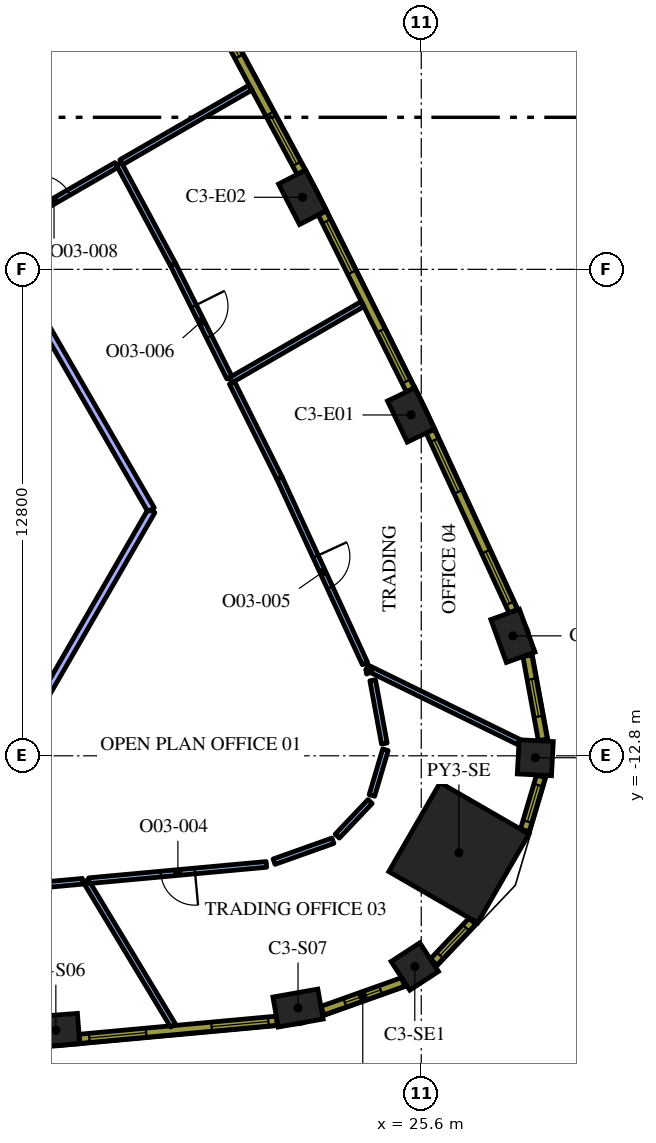
"""IFC4 building model, lengths in metres.
Left out: names, types, materials, properties, quantities, classifications, styles, units other than length and angle.
Written with IfcOpenShell. Run it as: python <this file> out.ifc"""

import sys

from ifc_helpers import new_model, si_unit, direction, frame, frame_2d, origin, origin_2d, place, context, subcontext, project, spatial, rectangle, extrude, element, fill, save


model = new_model("IFC4")
c1 = context("Model", 3, precision=1e-05, world=origin(), true_north=direction((0.0, 1.0)))
c2 = subcontext(c1, "Body", "Model", "MODEL_VIEW")
j1 = project(units=[si_unit("LENGTHUNIT", "METRE"), si_unit("PLANEANGLEUNIT", "RADIAN")], contexts=[c1])
p1 = place(None, origin())
s1 = spatial("IfcSite", under=j1, at=p1, CompositionType="ELEMENT")
p2 = place(p1, origin())
s2 = spatial("IfcBuilding", under=s1, at=p2, CompositionType="ELEMENT")
p3 = place(p2, frame((0.0, 0.0, 171.0)))
s3 = spatial("IfcBuildingStorey", under=s2, at=p3, CompositionType="ELEMENT", Elevation=171.0)
p4 = place(p3, frame((26.591, -15.352, 0.0), z_axis=(0.0, 0.0, 1.0), x_axis=(0.866025403784, -0.5, 0.0)))
e1 = element("IfcColumn", 1, at=p4, inside=s3, PredefinedType="COLUMN", context=c2, shape_type="SweptSolid", body=[
    extrude(rectangle(XDim=2.7, YDim=2.7, at=origin_2d()), origin(), (0.0, 0.0, 1.0), 4.2),
])
for number, where, z_axis, x_axis in (
    (2, (15.985, -20.022, 0.0), (0.0, 0.0, 1.0), (0.997, 0.076, 0.0)),
    (3, (22.357, -19.437, 0.0), (0.0, 0.0, 1.0), (0.985, 0.175, 0.0)),
):
    element("IfcColumn", number, at=place(p3, frame(where, z_axis=z_axis, x_axis=x_axis)), inside=s3, PredefinedType="COLUMN", context=c2, shape_type="SweptSolid", body=[
        extrude(rectangle(XDim=1.2, YDim=0.8, at=origin_2d()), origin(), (0.0, 0.0, 1.0), 4.2),
    ])
for number, where, z_axis, x_axis in (
    (4, (25.43, -18.344, 0.0), (0.0, 0.0, 1.0), (0.838, 0.546, 0.0)),
    (5, (28.601, -12.851, 0.0), (0.0, 0.0, 1.0), (0.053, 0.999, 0.0)),
):
    element("IfcColumn", number, at=place(p3, frame(where, z_axis=z_axis, x_axis=x_axis)), inside=s3, PredefinedType="COLUMN", context=c2, shape_type="SweptSolid", body=[
        extrude(rectangle(XDim=0.9, YDim=0.9, at=origin_2d()), origin(), (0.0, 0.0, 1.0), 4.2),
    ])
for number, where, z_axis, x_axis in (
    (6, (28.012, -9.644, 0.0), (0.0, 0.0, 1.0), (-0.341, 0.94, 0.0)),
    (7, (25.332, -3.832, 0.0), (0.0, 0.0, 1.0), (-0.433, 0.902, 0.0)),
    (8, (22.476, 1.896, 0.0), (0.0, 0.0, 1.0), (-0.46, 0.888, 0.0)),
):
    element("IfcColumn", number, at=place(p3, frame(where, z_axis=z_axis, x_axis=x_axis)), inside=s3, PredefinedType="COLUMN", context=c2, shape_type="SweptSolid", body=[
        extrude(rectangle(XDim=1.2, YDim=0.8, at=origin_2d()), origin(), (0.0, 0.0, 1.0), 4.2),
    ])
p5 = place(p3, frame((16.773, -16.094, 0.0), z_axis=(0.0, 0.0, 1.0), x_axis=(0.516844039178, -0.856079575253, 0.0)))
e9 = element("IfcWall", 9, at=p5, inside=s3, PredefinedType="PARTITIONING", context=c2, shape_type="SweptSolid", body=[
    extrude(rectangle(XDim=4.446, YDim=0.15, at=frame_2d((2.223, 0.0))), origin(), (0.0, 0.0, 1.0), 3.15),
])
p6 = place(p3, frame((15.692, -16.193, 0.0), z_axis=(0.0, 0.0, 1.0), x_axis=(0.995818997537, 0.091348366946, 0.0)))
e10 = element("IfcWall", 10, at=p6, inside=s3, PredefinedType="PARTITIONING", context=c2, shape_type="SweptSolid", body=[
    extrude(rectangle(XDim=1.002, YDim=0.15, at=frame_2d((0.501, 0.0))), origin(), (0.0, 0.0, 1.0), 3.15),
])
p7 = place(p3, frame((24.169, -10.48, 0.0), z_axis=(0.0, 0.0, 1.0), x_axis=(0.898142173557, -0.439705169491, 0.0)))
e11 = element("IfcWall", 11, at=p7, inside=s3, PredefinedType="PARTITIONING", context=c2, shape_type="SweptSolid", body=[
    extrude(rectangle(XDim=4.458, YDim=0.15, at=frame_2d((2.229, 0.0))), origin(), (0.0, 0.0, 1.0), 3.15),
])
p8 = place(p3, frame((21.525, -15.657, 0.0), z_axis=(0.0, 0.0, 1.0), x_axis=(-0.99581172086, -0.091427657734, 0.0)))
e12 = element("IfcWall", 12, at=p8, inside=s3, PredefinedType="PARTITIONING", context=c2, shape_type="SweptSolid", body=[
    extrude(rectangle(XDim=4.689, YDim=0.15, at=frame_2d((2.344, 0.0))), origin(), (0.0, 0.0, 1.0), 3.15),
])
p9 = place(p8, frame((1.889, 0.0, 0.0)))
e13 = element("IfcOpeningElement", 13, at=p9, cuts=e12, PredefinedType="OPENING", context=c2, shape_type="SweptSolid", body=[
    extrude(rectangle(XDim=0.9, YDim=2.1, at=frame_2d((0.45, 1.05))), frame((0.0, 0.085, 0.0), z_axis=(0.0, -1.0, 0.0), x_axis=(1.0, 0.0, 0.0)), (0.0, 0.0, 1.0), 0.17),
])
p10 = place(p3, frame((21.727, -15.586, 0.0), z_axis=(0.0, 0.0, 1.0), x_axis=(0.942087520852, 0.335367116835, 0.0)))
e14 = element("IfcWall", 14, at=p10, inside=s3, PredefinedType="PARTITIONING", context=c2, shape_type="SweptSolid", body=[
    extrude(rectangle(XDim=1.644, YDim=0.15, at=frame_2d((0.822, 0.0))), origin(), (0.0, 0.0, 1.0), 3.15),
])
p11 = place(p3, frame((23.389, -14.914, 0.0), z_axis=(0.0, 0.0, 1.0), x_axis=(0.688003360899, 0.725707499886, 0.0)))
e15 = element("IfcWall", 15, at=p11, inside=s3, PredefinedType="PARTITIONING", context=c2, shape_type="SweptSolid", body=[
    extrude(rectangle(XDim=1.256, YDim=0.15, at=frame_2d((0.628, 0.0))), origin(), (0.0, 0.0, 1.0), 3.15),
])
p12 = place(p3, frame((24.301, -13.844, 0.0), z_axis=(0.0, 0.0, 1.0), x_axis=(0.284386145133, 0.958709820778, 0.0)))
e16 = element("IfcWall", 16, at=p12, inside=s3, PredefinedType="PARTITIONING", context=c2, shape_type="SweptSolid", body=[
    extrude(rectangle(XDim=1.256, YDim=0.15, at=frame_2d((0.628, 0.0))), origin(), (0.0, 0.0, 1.0), 3.15),
])
p13 = place(p3, frame((24.628, -12.477, 0.0), z_axis=(0.0, 0.0, 1.0), x_axis=(-0.180725554657, 0.98353356521, 0.0)))
e17 = element("IfcWall", 17, at=p13, inside=s3, PredefinedType="PARTITIONING", context=c2, shape_type="SweptSolid", body=[
    extrude(rectangle(XDim=1.693, YDim=0.15, at=frame_2d((0.846, 0.0))), origin(), (0.0, 0.0, 1.0), 3.15),
])
p14 = place(p3, frame((24.233, -10.618, 0.0), z_axis=(0.0, 0.0, 1.0), x_axis=(-0.423685108901, 0.905809543169, 0.0)))
e18 = element("IfcWall", 18, at=p14, inside=s3, PredefinedType="PARTITIONING", context=c2, shape_type="SweptSolid", body=[
    extrude(rectangle(XDim=0.033, YDim=0.15, at=frame_2d((0.017, 0.0))), origin(), (0.0, 0.0, 1.0), 3.15),
])
p15 = place(p3, frame((20.585, -2.916, 0.0), z_axis=(0.0, 0.0, 1.0), x_axis=(0.866041532296, 0.499972063559, 0.0)))
e19 = element("IfcWall", 19, at=p15, inside=s3, PredefinedType="PARTITIONING", context=c2, shape_type="SweptSolid", body=[
    extrude(rectangle(XDim=4.008, YDim=0.15, at=frame_2d((2.004, 0.0))), origin(), (0.0, 0.0, 1.0), 3.15),
])
p16 = place(p3, frame((21.869, -5.493, 0.0), z_axis=(0.0, 0.0, 1.0), x_axis=(0.4187440514, -0.908104299856, 0.0)))
e20 = element("IfcWall", 20, at=p16, inside=s3, PredefinedType="PARTITIONING", context=c2, shape_type="SweptSolid", body=[
    extrude(rectangle(XDim=5.373, YDim=0.15, at=frame_2d((2.686, 0.0))), origin(), (0.0, 0.0, 1.0), 3.15),
])
p17 = place(p16, frame((2.273, 0.0, 0.0)))
e21 = element("IfcOpeningElement", 21, at=p17, cuts=e20, PredefinedType="OPENING", context=c2, shape_type="SweptSolid", body=[
    extrude(rectangle(XDim=0.9, YDim=2.1, at=frame_2d((0.45, 1.05))), frame((0.0, 0.085, 0.0), z_axis=(0.0, -1.0, 0.0), x_axis=(1.0, 0.0, 0.0)), (0.0, 0.0, 1.0), 0.17),
])
p18 = place(p3, frame((21.869, -5.493, 0.0), z_axis=(0.0, 0.0, 1.0), x_axis=(-0.446168399468, 0.894949026099, 0.0)))
e22 = element("IfcWall", 22, at=p18, inside=s3, PredefinedType="PARTITIONING", context=c2, shape_type="SweptSolid", body=[
    extrude(rectangle(XDim=2.804, YDim=0.15, at=frame_2d((1.402, 0.0))), origin(), (0.0, 0.0, 1.0), 3.15),
])
p19 = place(p3, frame((19.066, 0.129, 0.0), z_axis=(0.0, 0.0, 1.0), x_axis=(0.446215695511, -0.894925445543, 0.0)))
e23 = element("IfcWall", 23, at=p19, inside=s3, PredefinedType="PARTITIONING", context=c2, shape_type="SweptSolid", body=[
    extrude(rectangle(XDim=3.328, YDim=0.15, at=frame_2d((1.664, 0.0))), origin(), (0.0, 0.0, 1.0), 3.15),
])
p20 = place(p19, frame((1.228, 0.0, 0.0)))
e24 = element("IfcOpeningElement", 24, at=p20, cuts=e23, PredefinedType="OPENING", context=c2, shape_type="SweptSolid", body=[
    extrude(rectangle(XDim=0.9, YDim=2.1, at=frame_2d((0.45, 1.05))), frame((0.0, 0.085, 0.0), z_axis=(0.0, -1.0, 0.0), x_axis=(1.0, 0.0, 0.0)), (0.0, 0.0, 1.0), 0.17),
])
p21 = place(p3, frame((19.066, 0.129, 0.0), z_axis=(0.0, 0.0, 1.0), x_axis=(-0.473359743891, 0.88086920304, 0.0)))
e25 = element("IfcWall", 25, at=p21, inside=s3, PredefinedType="PARTITIONING", context=c2, shape_type="SweptSolid", body=[
    extrude(rectangle(XDim=3.01, YDim=0.15, at=frame_2d((1.505, 0.0))), origin(), (0.0, 0.0, 1.0), 3.15),
])
p22 = place(p3, frame((17.706, 2.819, 0.0), z_axis=(0.0, 0.0, 1.0), x_axis=(0.866023031919, 0.500004108169, 0.0)))
e26 = element("IfcWall", 26, at=p22, inside=s3, PredefinedType="PARTITIONING", context=c2, shape_type="SweptSolid", body=[
    extrude(rectangle(XDim=3.927, YDim=0.15, at=frame_2d((1.963, 0.0))), origin(), (0.0, 0.0, 1.0), 3.15),
])
p23 = place(p3, frame((14.334, 0.872, 0.0), z_axis=(0.0, 0.0, 1.0), x_axis=(0.866027010039, 0.499997217876, 0.0)))
e27 = element("IfcWall", 27, at=p23, inside=s3, PredefinedType="PARTITIONING", context=c2, shape_type="SweptSolid", body=[
    extrude(rectangle(XDim=3.743, YDim=0.15, at=frame_2d((1.872, 0.0))), origin(), (0.0, 0.0, 1.0), 3.15),
])
p24 = place(p23, frame((1.4, 0.0, 0.0)))
e28 = element("IfcOpeningElement", 28, at=p24, cuts=e27, PredefinedType="OPENING", context=c2, shape_type="SweptSolid", body=[
    extrude(rectangle(XDim=0.9, YDim=2.1, at=frame_2d((0.45, 1.05))), frame((0.0, 0.085, 0.0), z_axis=(0.0, -1.0, 0.0), x_axis=(1.0, 0.0, 0.0)), (0.0, 0.0, 1.0), 0.17),
])
p25 = place(p3, frame((14.766, -12.824, 0.0), z_axis=(0.0, 0.0, 1.0), x_axis=(0.500009869004, 0.866019705837, 0.0)))
e29 = element("IfcWall", 29, at=p25, inside=s3, PredefinedType="PARTITIONING", context=c2, shape_type="SweptSolid", body=[
    extrude(rectangle(XDim=7.475, YDim=0.2, at=frame_2d((3.738, 0.0))), origin(), (0.0, 0.0, 1.0), 3.15),
])
p26 = place(p3, frame((18.489, -6.324, 0.0), z_axis=(0.0, 0.0, 1.0), x_axis=(-0.500003913404, 0.866023144368, 0.0)))
e30 = element("IfcWall", 30, at=p26, inside=s3, PredefinedType="PARTITIONING", context=c2, shape_type="SweptSolid", body=[
    extrude(rectangle(XDim=8.234, YDim=0.2, at=frame_2d((4.117, 0.0))), origin(), (0.0, 0.0, 1.0), 3.15),
])
p27 = place(p3, frame((16.606, -20.247, 0.0), z_axis=(0.0, 0.0, 1.0), x_axis=(0.995808712151, 0.091460422067, 0.0)))
e31 = element("IfcWall", 31, at=p27, inside=s3, PredefinedType="SOLIDWALL", context=c2, shape_type="SweptSolid", body=[
    extrude(rectangle(XDim=5.213, YDim=0.24, at=frame_2d((2.606, 0.0))), origin(), (0.0, 0.0, 1.0), 3.95),
])
p28 = place(p27, frame((0.261, 0.0, 0.9)))
e32 = element("IfcOpeningElement", 32, at=p28, cuts=e31, PredefinedType="OPENING", context=c2, shape_type="SweptSolid", body=[
    extrude(rectangle(XDim=1.5, YDim=2.55, at=frame_2d((0.75, 1.275))), frame((0.0, 0.13, 0.0), z_axis=(0.0, -1.0, 0.0), x_axis=(1.0, 0.0, 0.0)), (0.0, 0.0, 1.0), 0.26),
])
p29 = place(p27, frame((3.492, 0.0, 0.9)))
e33 = element("IfcOpeningElement", 33, at=p29, cuts=e31, PredefinedType="OPENING", context=c2, shape_type="SweptSolid", body=[
    extrude(rectangle(XDim=1.5, YDim=2.55, at=frame_2d((0.75, 1.275))), frame((0.0, 0.13, 0.0), z_axis=(0.0, -1.0, 0.0), x_axis=(1.0, 0.0, 0.0)), (0.0, 0.0, 1.0), 0.26),
])
p30 = place(p3, frame((23.001, -19.505, 0.0), z_axis=(0.0, 0.0, 1.0), x_axis=(0.942099727267, 0.335332825539, 0.0)))
e34 = element("IfcWall", 34, at=p30, inside=s3, PredefinedType="SOLIDWALL", context=c2, shape_type="SweptSolid", body=[
    extrude(rectangle(XDim=2.25, YDim=0.24, at=frame_2d((1.125, 0.0))), origin(), (0.0, 0.0, 1.0), 3.95),
])
p31 = place(p30, frame((0.625, 0.0, 0.9)))
e35 = element("IfcOpeningElement", 35, at=p31, cuts=e34, PredefinedType="OPENING", context=c2, shape_type="SweptSolid", body=[
    extrude(rectangle(XDim=1.0, YDim=2.55, at=frame_2d((0.5, 1.275))), frame((0.0, 0.13, 0.0), z_axis=(0.0, -1.0, 0.0), x_axis=(1.0, 0.0, 0.0)), (0.0, 0.0, 1.0), 0.26),
])
p32 = place(p3, frame((25.927, -18.226, 0.0), z_axis=(0.0, 0.0, 1.0), x_axis=(0.687986858937, 0.725723144133, 0.0)))
e36 = element("IfcWall", 36, at=p32, inside=s3, PredefinedType="SOLIDWALL", context=c2, shape_type="SweptSolid", body=[
    extrude(rectangle(XDim=1.481, YDim=0.24, at=frame_2d((0.741, 0.0))), origin(), (0.0, 0.0, 1.0), 3.95),
])
p33 = place(p32, frame((0.241, 0.0, 0.9)))
e37 = element("IfcOpeningElement", 37, at=p33, cuts=e36, PredefinedType="OPENING", context=c2, shape_type="SweptSolid", body=[
    extrude(rectangle(XDim=1.0, YDim=2.55, at=frame_2d((0.5, 1.275))), frame((0.0, 0.13, 0.0), z_axis=(0.0, -1.0, 0.0), x_axis=(1.0, 0.0, 0.0)), (0.0, 0.0, 1.0), 0.26),
])
p34 = place(p3, frame((28.326, -14.76, 0.0), z_axis=(0.0, 0.0, 1.0), x_axis=(0.284413721403, 0.958701640281, 0.0)))
e38 = element("IfcWall", 38, at=p34, inside=s3, PredefinedType="SOLIDWALL", context=c2, shape_type="SweptSolid", body=[
    extrude(rectangle(XDim=1.482, YDim=0.24, at=frame_2d((0.741, 0.0))), origin(), (0.0, 0.0, 1.0), 3.95),
])
p35 = place(p34, frame((0.241, 0.0, 0.9)))
e39 = element("IfcOpeningElement", 39, at=p35, cuts=e38, PredefinedType="OPENING", context=c2, shape_type="SweptSolid", body=[
    extrude(rectangle(XDim=1.0, YDim=2.55, at=frame_2d((0.5, 1.275))), frame((0.0, 0.13, 0.0), z_axis=(0.0, -1.0, 0.0), x_axis=(1.0, 0.0, 0.0)), (0.0, 0.0, 1.0), 0.26),
])
p36 = place(p3, frame((28.799, -12.38, 0.0), z_axis=(0.0, 0.0, 1.0), x_axis=(-0.180737189259, 0.983531427265, 0.0)))
e40 = element("IfcWall", 40, at=p36, inside=s3, PredefinedType="SOLIDWALL", context=c2, shape_type="SweptSolid", body=[
    extrude(rectangle(XDim=2.25, YDim=0.24, at=frame_2d((1.125, 0.0))), origin(), (0.0, 0.0, 1.0), 3.95),
])
p37 = place(p36, frame((0.625, 0.0, 0.9)))
e41 = element("IfcOpeningElement", 41, at=p37, cuts=e40, PredefinedType="OPENING", context=c2, shape_type="SweptSolid", body=[
    extrude(rectangle(XDim=1.0, YDim=2.55, at=frame_2d((0.5, 1.275))), frame((0.0, 0.13, 0.0), z_axis=(0.0, -1.0, 0.0), x_axis=(1.0, 0.0, 0.0)), (0.0, 0.0, 1.0), 0.26),
])
p38 = place(p3, frame((28.02, -8.992, 0.0), z_axis=(0.0, 0.0, 1.0), x_axis=(-0.418722559465, 0.908114209885, 0.0)))
e42 = element("IfcWall", 42, at=p38, inside=s3, PredefinedType="SOLIDWALL", context=c2, shape_type="SweptSolid", body=[
    extrude(rectangle(XDim=5.213, YDim=0.24, at=frame_2d((2.606, 0.0))), origin(), (0.0, 0.0, 1.0), 3.95),
])
p39 = place(p38, frame((0.221, 0.0, 0.9)))
e43 = element("IfcOpeningElement", 43, at=p39, cuts=e42, PredefinedType="OPENING", context=c2, shape_type="SweptSolid", body=[
    extrude(rectangle(XDim=1.5, YDim=2.55, at=frame_2d((0.75, 1.275))), frame((0.0, 0.13, 0.0), z_axis=(0.0, -1.0, 0.0), x_axis=(1.0, 0.0, 0.0)), (0.0, 0.0, 1.0), 0.26),
])
p40 = place(p38, frame((3.452, 0.0, 0.9)))
e44 = element("IfcOpeningElement", 44, at=p40, cuts=e42, PredefinedType="OPENING", context=c2, shape_type="SweptSolid", body=[
    extrude(rectangle(XDim=1.5, YDim=2.55, at=frame_2d((0.75, 1.275))), frame((0.0, 0.13, 0.0), z_axis=(0.0, -1.0, 0.0), x_axis=(1.0, 0.0, 0.0)), (0.0, 0.0, 1.0), 0.26),
])
p41 = place(p3, frame((25.316, -3.171, 0.0), z_axis=(0.0, 0.0, 1.0), x_axis=(-0.446256171312, 0.8949052629, 0.0)))
e45 = element("IfcWall", 45, at=p41, inside=s3, PredefinedType="SOLIDWALL", context=c2, shape_type="SweptSolid", body=[
    extrude(rectangle(XDim=5.203, YDim=0.24, at=frame_2d((2.602, 0.0))), origin(), (0.0, 0.0, 1.0), 3.95),
])
p42 = place(p41, frame((0.248, 0.0, 0.9)))
e46 = element("IfcOpeningElement", 46, at=p42, cuts=e45, PredefinedType="OPENING", context=c2, shape_type="SweptSolid", body=[
    extrude(rectangle(XDim=1.5, YDim=2.55, at=frame_2d((0.75, 1.275))), frame((0.0, 0.13, 0.0), z_axis=(0.0, -1.0, 0.0), x_axis=(1.0, 0.0, 0.0)), (0.0, 0.0, 1.0), 0.26),
])
p43 = place(p41, frame((3.455, 0.0, 0.9)))
e47 = element("IfcOpeningElement", 47, at=p43, cuts=e45, PredefinedType="OPENING", context=c2, shape_type="SweptSolid", body=[
    extrude(rectangle(XDim=1.5, YDim=2.55, at=frame_2d((0.75, 1.275))), frame((0.0, 0.13, 0.0), z_axis=(0.0, -1.0, 0.0), x_axis=(1.0, 0.0, 0.0)), (0.0, 0.0, 1.0), 0.26),
])
p44 = place(p3, frame((22.44, 2.555, 0.0), z_axis=(0.0, 0.0, 1.0), x_axis=(-0.473349833294, 0.880874528704, 0.0)))
e48 = element("IfcWall", 48, at=p44, inside=s3, PredefinedType="SOLIDWALL", context=c2, shape_type="SweptSolid", body=[
    extrude(rectangle(XDim=5.204, YDim=0.24, at=frame_2d((2.602, 0.0))), origin(), (0.0, 0.0, 1.0), 3.95),
])
p45 = place(p44, frame((0.248, 0.0, 0.9)))
e49 = element("IfcOpeningElement", 49, at=p45, cuts=e48, PredefinedType="OPENING", context=c2, shape_type="SweptSolid", body=[
    extrude(rectangle(XDim=1.5, YDim=2.55, at=frame_2d((0.75, 1.275))), frame((0.0, 0.13, 0.0), z_axis=(0.0, -1.0, 0.0), x_axis=(1.0, 0.0, 0.0)), (0.0, 0.0, 1.0), 0.26),
])
p46 = place(p44, frame((3.455, 0.0, 0.9)))
e50 = element("IfcOpeningElement", 50, at=p46, cuts=e48, PredefinedType="OPENING", context=c2, shape_type="SweptSolid", body=[
    extrude(rectangle(XDim=1.5, YDim=2.55, at=frame_2d((0.75, 1.275))), frame((0.0, 0.13, 0.0), z_axis=(0.0, -1.0, 0.0), x_axis=(1.0, 0.0, 0.0)), (0.0, 0.0, 1.0), 0.26),
])
p47 = place(p9, origin())
e51 = element("IfcDoor", 51, at=p47, inside=s3, OperationType="SINGLE_SWING_LEFT", PredefinedType="DOOR", context=c2, shape_type="SweptSolid", body=[
    extrude(rectangle(XDim=0.9, YDim=2.1, at=frame_2d((0.45, 1.05))), frame((0.0, 0.025, 0.0), z_axis=(0.0, -1.0, 0.0), x_axis=(1.0, 0.0, 0.0)), (0.0, 0.0, 1.0), 0.05),
])
fill(e13, e51)
p48 = place(p17, origin())
e52 = element("IfcDoor", 52, at=p48, inside=s3, OperationType="SINGLE_SWING_RIGHT", PredefinedType="DOOR", context=c2, shape_type="SweptSolid", body=[
    extrude(rectangle(XDim=0.9, YDim=2.1, at=frame_2d((0.45, 1.05))), frame((0.0, 0.025, 0.0), z_axis=(0.0, -1.0, 0.0), x_axis=(1.0, 0.0, 0.0)), (0.0, 0.0, 1.0), 0.05),
])
fill(e21, e52)
p49 = place(p20, origin())
e53 = element("IfcDoor", 53, at=p49, inside=s3, OperationType="SINGLE_SWING_RIGHT", PredefinedType="DOOR", context=c2, shape_type="SweptSolid", body=[
    extrude(rectangle(XDim=0.9, YDim=2.1, at=frame_2d((0.45, 1.05))), frame((0.0, 0.025, 0.0), z_axis=(0.0, -1.0, 0.0), x_axis=(1.0, 0.0, 0.0)), (0.0, 0.0, 1.0), 0.05),
])
fill(e24, e53)
p50 = place(p24, origin())
e54 = element("IfcDoor", 54, at=p50, inside=s3, OperationType="SINGLE_SWING_LEFT", PredefinedType="DOOR", context=c2, shape_type="SweptSolid", body=[
    extrude(rectangle(XDim=0.9, YDim=2.1, at=frame_2d((0.45, 1.05))), frame((0.0, 0.025, 0.0), z_axis=(0.0, -1.0, 0.0), x_axis=(1.0, 0.0, 0.0)), (0.0, 0.0, 1.0), 0.05),
])
fill(e28, e54)
p51 = place(p28, origin())
e55 = element("IfcWindow", 55, at=p51, inside=s3, PartitioningType="SINGLE_PANEL", PredefinedType="WINDOW", context=c2, shape_type="SweptSolid", body=[
    extrude(rectangle(XDim=1.5, YDim=2.55, at=frame_2d((0.75, 1.275))), frame((0.0, 0.04, 0.0), z_axis=(0.0, -1.0, 0.0), x_axis=(1.0, 0.0, 0.0)), (0.0, 0.0, 1.0), 0.06),
])
fill(e32, e55)
p52 = place(p29, origin())
e56 = element("IfcWindow", 56, at=p52, inside=s3, PartitioningType="SINGLE_PANEL", PredefinedType="WINDOW", context=c2, shape_type="SweptSolid", body=[
    extrude(rectangle(XDim=1.5, YDim=2.55, at=frame_2d((0.75, 1.275))), frame((0.0, 0.04, 0.0), z_axis=(0.0, -1.0, 0.0), x_axis=(1.0, 0.0, 0.0)), (0.0, 0.0, 1.0), 0.06),
])
fill(e33, e56)
p53 = place(p31, origin())
e57 = element("IfcWindow", 57, at=p53, inside=s3, PartitioningType="SINGLE_PANEL", PredefinedType="WINDOW", context=c2, shape_type="SweptSolid", body=[
    extrude(rectangle(XDim=1.0, YDim=2.55, at=frame_2d((0.5, 1.275))), frame((0.0, 0.04, 0.0), z_axis=(0.0, -1.0, 0.0), x_axis=(1.0, 0.0, 0.0)), (0.0, 0.0, 1.0), 0.06),
])
fill(e35, e57)
p54 = place(p33, origin())
e58 = element("IfcWindow", 58, at=p54, inside=s3, PartitioningType="SINGLE_PANEL", PredefinedType="WINDOW", context=c2, shape_type="SweptSolid", body=[
    extrude(rectangle(XDim=1.0, YDim=2.55, at=frame_2d((0.5, 1.275))), frame((0.0, 0.04, 0.0), z_axis=(0.0, -1.0, 0.0), x_axis=(1.0, 0.0, 0.0)), (0.0, 0.0, 1.0), 0.06),
])
fill(e37, e58)
p55 = place(p35, origin())
e59 = element("IfcWindow", 59, at=p55, inside=s3, PartitioningType="SINGLE_PANEL", PredefinedType="WINDOW", context=c2, shape_type="SweptSolid", body=[
    extrude(rectangle(XDim=1.0, YDim=2.55, at=frame_2d((0.5, 1.275))), frame((0.0, 0.04, 0.0), z_axis=(0.0, -1.0, 0.0), x_axis=(1.0, 0.0, 0.0)), (0.0, 0.0, 1.0), 0.06),
])
fill(e39, e59)
p56 = place(p37, origin())
e60 = element("IfcWindow", 60, at=p56, inside=s3, PartitioningType="SINGLE_PANEL", PredefinedType="WINDOW", context=c2, shape_type="SweptSolid", body=[
    extrude(rectangle(XDim=1.0, YDim=2.55, at=frame_2d((0.5, 1.275))), frame((0.0, 0.04, 0.0), z_axis=(0.0, -1.0, 0.0), x_axis=(1.0, 0.0, 0.0)), (0.0, 0.0, 1.0), 0.06),
])
fill(e41, e60)
p57 = place(p39, origin())
e61 = element("IfcWindow", 61, at=p57, inside=s3, PartitioningType="SINGLE_PANEL", PredefinedType="WINDOW", context=c2, shape_type="SweptSolid", body=[
    extrude(rectangle(XDim=1.5, YDim=2.55, at=frame_2d((0.75, 1.275))), frame((0.0, 0.04, 0.0), z_axis=(0.0, -1.0, 0.0), x_axis=(1.0, 0.0, 0.0)), (0.0, 0.0, 1.0), 0.06),
])
fill(e43, e61)
p58 = place(p40, origin())
e62 = element("IfcWindow", 62, at=p58, inside=s3, PartitioningType="SINGLE_PANEL", PredefinedType="WINDOW", context=c2, shape_type="SweptSolid", body=[
    extrude(rectangle(XDim=1.5, YDim=2.55, at=frame_2d((0.75, 1.275))), frame((0.0, 0.04, 0.0), z_axis=(0.0, -1.0, 0.0), x_axis=(1.0, 0.0, 0.0)), (0.0, 0.0, 1.0), 0.06),
])
fill(e44, e62)
p59 = place(p42, origin())
e63 = element("IfcWindow", 63, at=p59, inside=s3, PartitioningType="SINGLE_PANEL", PredefinedType="WINDOW", context=c2, shape_type="SweptSolid", body=[
    extrude(rectangle(XDim=1.5, YDim=2.55, at=frame_2d((0.75, 1.275))), frame((0.0, 0.04, 0.0), z_axis=(0.0, -1.0, 0.0), x_axis=(1.0, 0.0, 0.0)), (0.0, 0.0, 1.0), 0.06),
])
fill(e46, e63)
p60 = place(p43, origin())
e64 = element("IfcWindow", 64, at=p60, inside=s3, PartitioningType="SINGLE_PANEL", PredefinedType="WINDOW", context=c2, shape_type="SweptSolid", body=[
    extrude(rectangle(XDim=1.5, YDim=2.55, at=frame_2d((0.75, 1.275))), frame((0.0, 0.04, 0.0), z_axis=(0.0, -1.0, 0.0), x_axis=(1.0, 0.0, 0.0)), (0.0, 0.0, 1.0), 0.06),
])
fill(e47, e64)
p61 = place(p45, origin())
e65 = element("IfcWindow", 65, at=p61, inside=s3, PartitioningType="SINGLE_PANEL", PredefinedType="WINDOW", context=c2, shape_type="SweptSolid", body=[
    extrude(rectangle(XDim=1.5, YDim=2.55, at=frame_2d((0.75, 1.275))), frame((0.0, 0.04, 0.0), z_axis=(0.0, -1.0, 0.0), x_axis=(1.0, 0.0, 0.0)), (0.0, 0.0, 1.0), 0.06),
])
fill(e49, e65)
p62 = place(p46, origin())
e66 = element("IfcWindow", 66, at=p62, inside=s3, PartitioningType="SINGLE_PANEL", PredefinedType="WINDOW", context=c2, shape_type="SweptSolid", body=[
    extrude(rectangle(XDim=1.5, YDim=2.55, at=frame_2d((0.75, 1.275))), frame((0.0, 0.04, 0.0), z_axis=(0.0, -1.0, 0.0), x_axis=(1.0, 0.0, 0.0)), (0.0, 0.0, 1.0), 0.06),
])
fill(e50, e66)
save(model, sys.argv[1])
